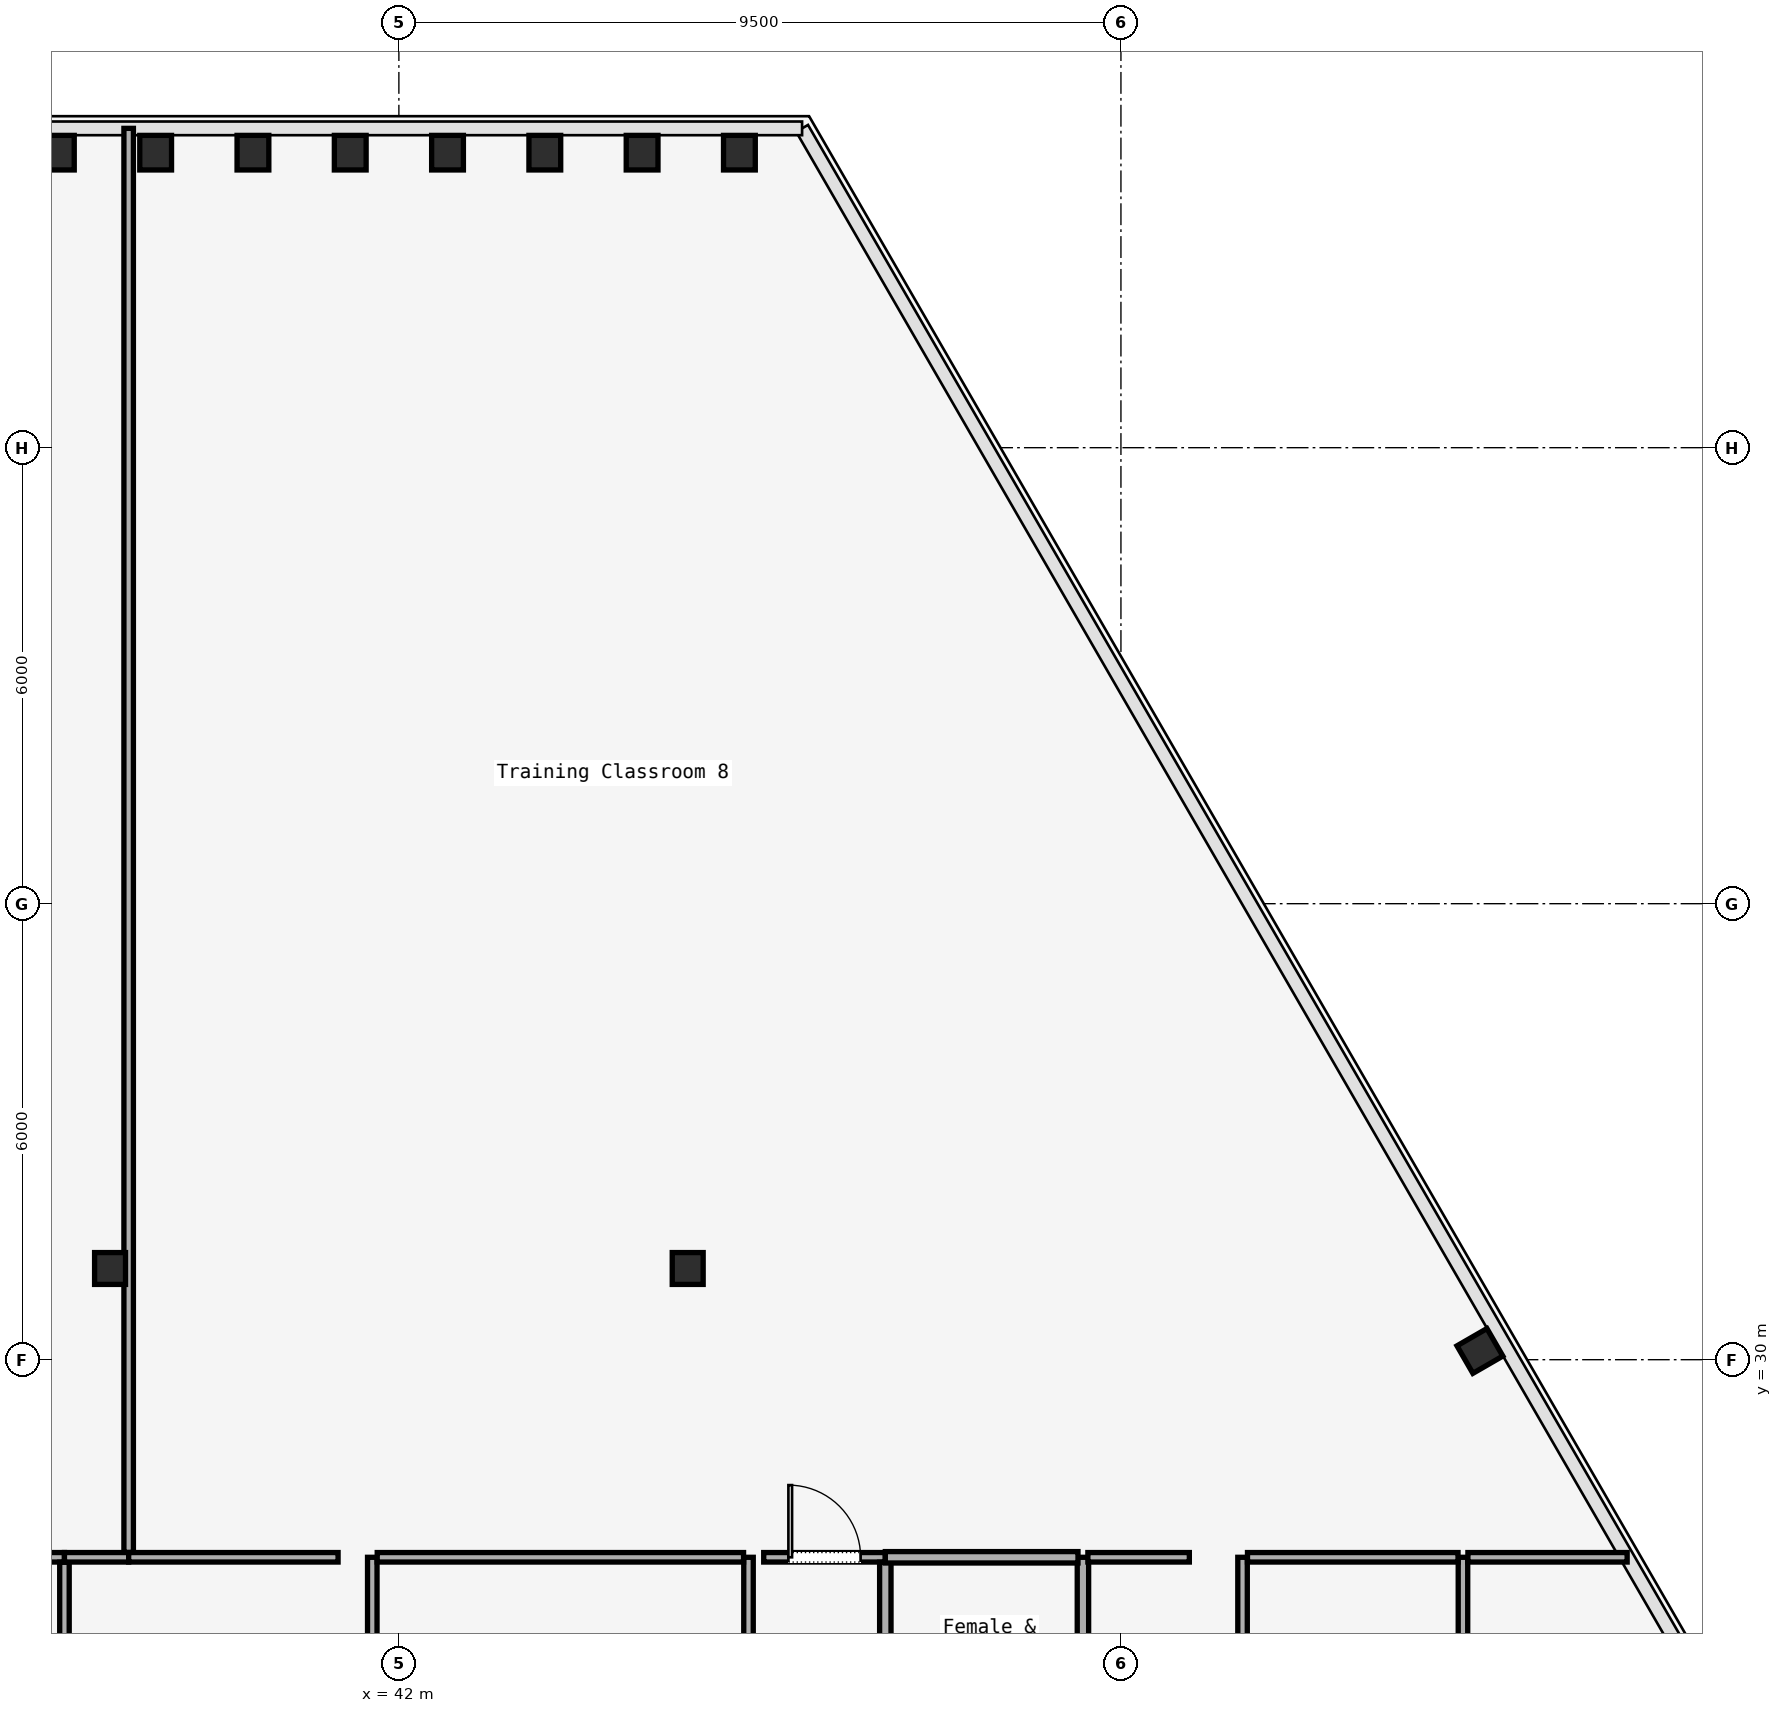
"""IFC4 building model, lengths in metres.
Left out: names, types, materials, properties, quantities, classifications, styles, units other than length and angle.
Written with IfcOpenShell. Run it as: python <this file> out.ifc"""

import sys

from ifc_helpers import new_model, si_unit, direction, frame, frame_2d, origin, origin_2d, place, context, subcontext, project, spatial, rectangle, i_section, extrude, element, fill, save


model = new_model("IFC4")
c1 = context("Model", 3, precision=1e-05, world=origin(), true_north=direction((0.0, 1.0)))
c2 = subcontext(c1, "Body", "Model", "MODEL_VIEW")
j1 = project(units=[si_unit("LENGTHUNIT", "METRE"), si_unit("PLANEANGLEUNIT", "RADIAN")], contexts=[c1])
p1 = place(None, origin())
s1 = spatial("IfcSite", under=j1, at=p1, CompositionType="ELEMENT")
p2 = place(p1, origin())
s2 = spatial("IfcBuilding", under=s1, at=p2, CompositionType="ELEMENT")
p3 = place(p2, frame((0.0, 0.0, 165.0)))
s3 = spatial("IfcBuildingStorey", under=s2, at=p3, CompositionType="ELEMENT", Elevation=165.0)
for number, where, z_axis, x_axis in (
    (1, (38.2, 31.2, 0.0), (0.0, 0.0, 1.0), (1.0, 0.0, 0.0)),
    (2, (45.8, 31.2, 0.0), (0.0, 0.0, 1.0), (1.0, 0.0, 0.0)),
):
    element("IfcColumn", number, at=place(p3, frame(where, z_axis=z_axis, x_axis=x_axis)), inside=s3, PredefinedType="COLUMN", context=c2, shape_type="SweptSolid", body=[
        extrude(i_section(OverallWidth=0.407, OverallDepth=0.419, WebThickness=0.031, FlangeThickness=0.049, FilletRadius=0.015, at=origin_2d()), origin(), (0.0, 0.0, 1.0), 3.58),
    ])
for number, where, z_axis, x_axis in (
    (3, (56.223, 30.115, 0.0), (0.0, 0.0, 1.0), (-0.5, 0.866, 0.0)),
    (4, (46.48, 45.882, 0.0), (0.0, 0.0, 1.0), (1.0, 0.0, 0.0)),
    (5, (45.2, 45.882, 0.0), (0.0, 0.0, 1.0), (1.0, 0.0, 0.0)),
    (6, (43.92, 45.882, 0.0), (0.0, 0.0, 1.0), (1.0, 0.0, 0.0)),
    (7, (42.64, 45.882, 0.0), (0.0, 0.0, 1.0), (1.0, 0.0, 0.0)),
    (8, (41.36, 45.882, 0.0), (0.0, 0.0, 1.0), (1.0, 0.0, 0.0)),
    (9, (40.08, 45.882, 0.0), (0.0, 0.0, 1.0), (1.0, 0.0, 0.0)),
    (10, (38.8, 45.882, 0.0), (0.0, 0.0, 1.0), (1.0, 0.0, 0.0)),
    (11, (37.52, 45.882, 0.0), (0.0, 0.0, 1.0), (1.0, 0.0, 0.0)),
):
    element("IfcColumn", number, at=place(p3, frame(where, z_axis=z_axis, x_axis=x_axis)), inside=s3, PredefinedType="COLUMN", context=c2, shape_type="SweptSolid", body=[
        extrude(i_section(OverallWidth=0.418, OverallDepth=0.455, WebThickness=0.042, FlangeThickness=0.052, FilletRadius=0.015, at=origin_2d()), origin(), (0.0, 0.0, 1.0), 3.58),
    ])
p4 = place(p3, frame((35.865, 27.4, 0.0), z_axis=(0.0, 0.0, 1.0), x_axis=(1.0, 0.0, 0.0)))
e12 = element("IfcWall", 12, at=p4, inside=s3, PredefinedType="PARTITIONING", context=c2, shape_type="SweptSolid", body=[
    extrude(rectangle(XDim=1.735, YDim=0.125, at=frame_2d((0.868, 0.0))), origin(), (0.0, 0.0, 1.0), 3.01),
])
p5 = place(p4, frame((0.393, 0.0, 0.0)))
e13 = element("IfcOpeningElement", 13, at=p5, cuts=e12, PredefinedType="OPENING", context=c2, shape_type="SweptSolid", body=[
    extrude(rectangle(XDim=0.95, YDim=2.2, at=frame_2d((0.475, 1.1))), frame((0.0, 0.062, 0.0), z_axis=(0.0, -1.0, 0.0), x_axis=(1.0, 0.0, 0.0)), (0.0, 0.0, 1.0), 0.125),
])
p6 = place(p3, frame((37.6, 27.335, 0.0), z_axis=(0.0, 0.0, 1.0), x_axis=(0.0, -1.0, 0.0)))
e14 = element("IfcWall", 14, at=p6, inside=s3, PredefinedType="PARTITIONING", context=c2, shape_type="SweptSolid", body=[
    extrude(rectangle(XDim=5.655, YDim=0.125, at=frame_2d((2.828, 0.0))), origin(), (0.0, 0.0, 1.0), 3.01),
])
p7 = place(p6, frame((2.353, 0.0, 0.0)))
e15 = element("IfcOpeningElement", 15, at=p7, cuts=e14, PredefinedType="OPENING", context=c2, shape_type="SweptSolid", body=[
    extrude(rectangle(XDim=0.95, YDim=2.2, at=frame_2d((0.475, 1.1))), frame((0.0, 0.062, 0.0), z_axis=(0.0, -1.0, 0.0), x_axis=(1.0, 0.0, 0.0)), (0.0, 0.0, 1.0), 0.125),
])
p8 = place(p3, frame((46.6, 24.254, 0.0), z_axis=(0.0, 0.0, 1.0), x_axis=(0.0, 1.0, 0.0)))
e16 = element("IfcWall", 16, at=p8, inside=s3, PredefinedType="PARTITIONING", context=c2, shape_type="SweptSolid", body=[
    extrude(rectangle(XDim=3.146, YDim=0.125, at=frame_2d((1.573, 0.0))), origin(), (0.0, 0.0, 1.0), 3.01),
])
p9 = place(p8, frame((1.098, 0.0, 0.0)))
e17 = element("IfcOpeningElement", 17, at=p9, cuts=e16, PredefinedType="OPENING", context=c2, shape_type="SweptSolid", body=[
    extrude(rectangle(XDim=0.95, YDim=2.2, at=frame_2d((0.475, 1.1))), frame((0.0, 0.062, 0.0), z_axis=(0.0, -1.0, 0.0), x_axis=(1.0, 0.0, 0.0)), (0.0, 0.0, 1.0), 0.125),
])
p10 = place(p3, frame((46.8, 27.4, 0.0), z_axis=(0.0, 0.0, 1.0), x_axis=(1.0, 0.0, 0.0)))
e18 = element("IfcWall", 18, at=p10, inside=s3, PredefinedType="PARTITIONING", context=c2, shape_type="SweptSolid", body=[
    extrude(rectangle(XDim=1.6, YDim=0.125, at=frame_2d((0.8, 0.0))), origin(), (0.0, 0.0, 1.0), 3.01),
])
p11 = place(p10, frame((0.325, 0.0, 0.0)))
e19 = element("IfcOpeningElement", 19, at=p11, cuts=e18, PredefinedType="OPENING", context=c2, shape_type="SweptSolid", body=[
    extrude(rectangle(XDim=0.95, YDim=2.2, at=frame_2d((0.475, 1.1))), frame((0.0, 0.062, 0.0), z_axis=(0.0, -1.0, 0.0), x_axis=(1.0, 0.0, 0.0)), (0.0, 0.0, 1.0), 0.125),
])
p12 = place(p3, frame((48.4, 27.335, 0.0), z_axis=(0.0, 0.0, 1.0), x_axis=(0.0, -1.0, 0.0)))
e20 = element("IfcWall", 20, at=p12, inside=s3, PredefinedType="PARTITIONING", context=c2, shape_type="SweptSolid", body=[
    extrude(rectangle(XDim=6.279, YDim=0.15, at=frame_2d((3.14, 0.0))), origin(), (0.0, 0.0, 1.0), 3.01),
])
p13 = place(p12, frame((2.24, 0.0, 0.0)))
e21 = element("IfcOpeningElement", 21, at=p13, cuts=e20, PredefinedType="OPENING", context=c2, shape_type="SweptSolid", body=[
    extrude(rectangle(XDim=0.9, YDim=2.15, at=frame_2d((0.45, 1.075))), frame((0.0, 0.075, 0.0), z_axis=(0.0, -1.0, 0.0), x_axis=(1.0, 0.0, 0.0)), (0.0, 0.0, 1.0), 0.15),
])
p14 = place(p3, frame((56.0, 17.065, 0.0), z_axis=(0.0, 0.0, 1.0), x_axis=(0.0, 1.0, 0.0)))
e22 = element("IfcWall", 22, at=p14, inside=s3, PredefinedType="PARTITIONING", context=c2, shape_type="SweptSolid", body=[
    extrude(rectangle(XDim=10.335, YDim=0.125, at=frame_2d((5.167, 0.0))), origin(), (0.0, 0.0, 1.0), 3.01),
])
p15 = place(p3, frame((56.065, 27.4, 0.0), z_axis=(0.0, 0.0, 1.0), x_axis=(1.0, 0.0, 0.0)))
e23 = element("IfcWall", 23, at=p15, inside=s3, PredefinedType="PARTITIONING", context=c2, shape_type="SweptSolid", body=[
    extrude(rectangle(XDim=2.095, YDim=0.125, at=frame_2d((1.048, 0.0))), origin(), (0.0, 0.0, 1.0), 3.01),
])
p16 = place(p3, frame((51.0, 21.121, 0.0), z_axis=(0.0, 0.0, 1.0), x_axis=(0.0, 1.0, 0.0)))
e24 = element("IfcWall", 24, at=p16, inside=s3, PredefinedType="PARTITIONING", context=c2, shape_type="SweptSolid", body=[
    extrude(rectangle(XDim=6.279, YDim=0.15, at=frame_2d((3.139, 0.0))), origin(), (0.0, 0.0, 1.0), 3.01),
])
p17 = place(p3, frame((51.065, 27.4, 0.0), z_axis=(0.0, 0.0, 1.0), x_axis=(1.0, 0.0, 0.0)))
e25 = element("IfcWall", 25, at=p17, inside=s3, PredefinedType="PARTITIONING", context=c2, shape_type="SweptSolid", body=[
    extrude(rectangle(XDim=1.335, YDim=0.125, at=frame_2d((0.667, 0.0))), origin(), (0.0, 0.0, 1.0), 3.01),
])
p18 = place(p3, frame((53.1, 27.4, 0.0), z_axis=(0.0, 0.0, 1.0), x_axis=(0.0, -1.0, 0.0)))
e26 = element("IfcWall", 26, at=p18, inside=s3, PredefinedType="PARTITIONING", context=c2, shape_type="SweptSolid", body=[
    extrude(rectangle(XDim=10.335, YDim=0.125, at=frame_2d((5.167, 0.0))), origin(), (0.0, 0.0, 1.0), 3.01),
])
p19 = place(p3, frame((53.165, 27.4, 0.0), z_axis=(0.0, 0.0, 1.0), x_axis=(1.0, 0.0, 0.0)))
e27 = element("IfcWall", 27, at=p19, inside=s3, PredefinedType="PARTITIONING", context=c2, shape_type="SweptSolid", body=[
    extrude(rectangle(XDim=2.77, YDim=0.125, at=frame_2d((1.385, 0.0))), origin(), (0.0, 0.0, 1.0), 3.01),
])
p20 = place(p3, frame((48.4, 27.4, 0.0), z_axis=(0.0, 0.0, 1.0), x_axis=(1.0, 0.0, 0.0)))
e28 = element("IfcWall", 28, at=p20, inside=s3, PredefinedType="PARTITIONING", context=c2, shape_type="SweptSolid", body=[
    extrude(rectangle(XDim=2.535, YDim=0.15, at=frame_2d((1.268, 0.0))), origin(), (0.0, 0.0, 1.0), 3.01),
])
p21 = place(p3, frame((41.65, 27.4, 0.0), z_axis=(0.0, 0.0, 1.0), x_axis=(0.0, -1.0, 0.0)))
e29 = element("IfcWall", 29, at=p21, inside=s3, PredefinedType="PARTITIONING", context=c2, shape_type="SweptSolid", body=[
    extrude(rectangle(XDim=3.146, YDim=0.125, at=frame_2d((1.573, 0.0))), origin(), (0.0, 0.0, 1.0), 3.01),
])
p22 = place(p3, frame((37.6, 27.4, 0.0), z_axis=(0.0, 0.0, 1.0), x_axis=(1.0, 0.0, 0.0)))
e30 = element("IfcWall", 30, at=p22, inside=s3, PredefinedType="PARTITIONING", context=c2, shape_type="SweptSolid", body=[
    extrude(rectangle(XDim=0.845, YDim=0.125, at=frame_2d((0.422, 0.0))), origin(), (0.0, 0.0, 1.0), 3.01),
])
p23 = place(p3, frame((38.445, 27.4, 0.0), z_axis=(0.0, 0.0, 1.0), x_axis=(1.0, 0.0, 0.0)))
e31 = element("IfcWall", 31, at=p23, inside=s3, PredefinedType="PARTITIONING", context=c2, shape_type="SweptSolid", body=[
    extrude(rectangle(XDim=2.755, YDim=0.125, at=frame_2d((1.377, 0.0))), origin(), (0.0, 0.0, 1.0), 3.01),
])
p24 = place(p3, frame((41.715, 27.4, 0.0), z_axis=(0.0, 0.0, 1.0), x_axis=(1.0, 0.0, 0.0)))
e32 = element("IfcWall", 32, at=p24, inside=s3, PredefinedType="PARTITIONING", context=c2, shape_type="SweptSolid", body=[
    extrude(rectangle(XDim=4.82, YDim=0.125, at=frame_2d((2.41, 0.0))), origin(), (0.0, 0.0, 1.0), 3.01),
])
p25 = place(p3, frame((38.445, 46.202, 0.0), z_axis=(0.0, 0.0, 1.0), x_axis=(0.0, -1.0, 0.0)))
e33 = element("IfcWall", 33, at=p25, inside=s3, PredefinedType="PARTITIONING", context=c2, shape_type="SweptSolid", body=[
    extrude(rectangle(XDim=18.737, YDim=0.125, at=frame_2d((9.368, 0.0))), origin(), (0.0, 0.0, 1.0), 3.01),
])
p26 = place(p11, origin())
e34 = element("IfcDoor", 34, at=p26, inside=s3, OperationType="SINGLE_SWING_RIGHT", PredefinedType="DOOR", context=c2, shape_type="SweptSolid", body=[
    extrude(rectangle(XDim=0.95, YDim=2.2, at=frame_2d((0.475, 1.1))), frame((0.0, 0.025, 0.0), z_axis=(0.0, -1.0, 0.0), x_axis=(1.0, 0.0, 0.0)), (0.0, 0.0, 1.0), 0.05),
])
fill(e19, e34)
save(model, sys.argv[1])
